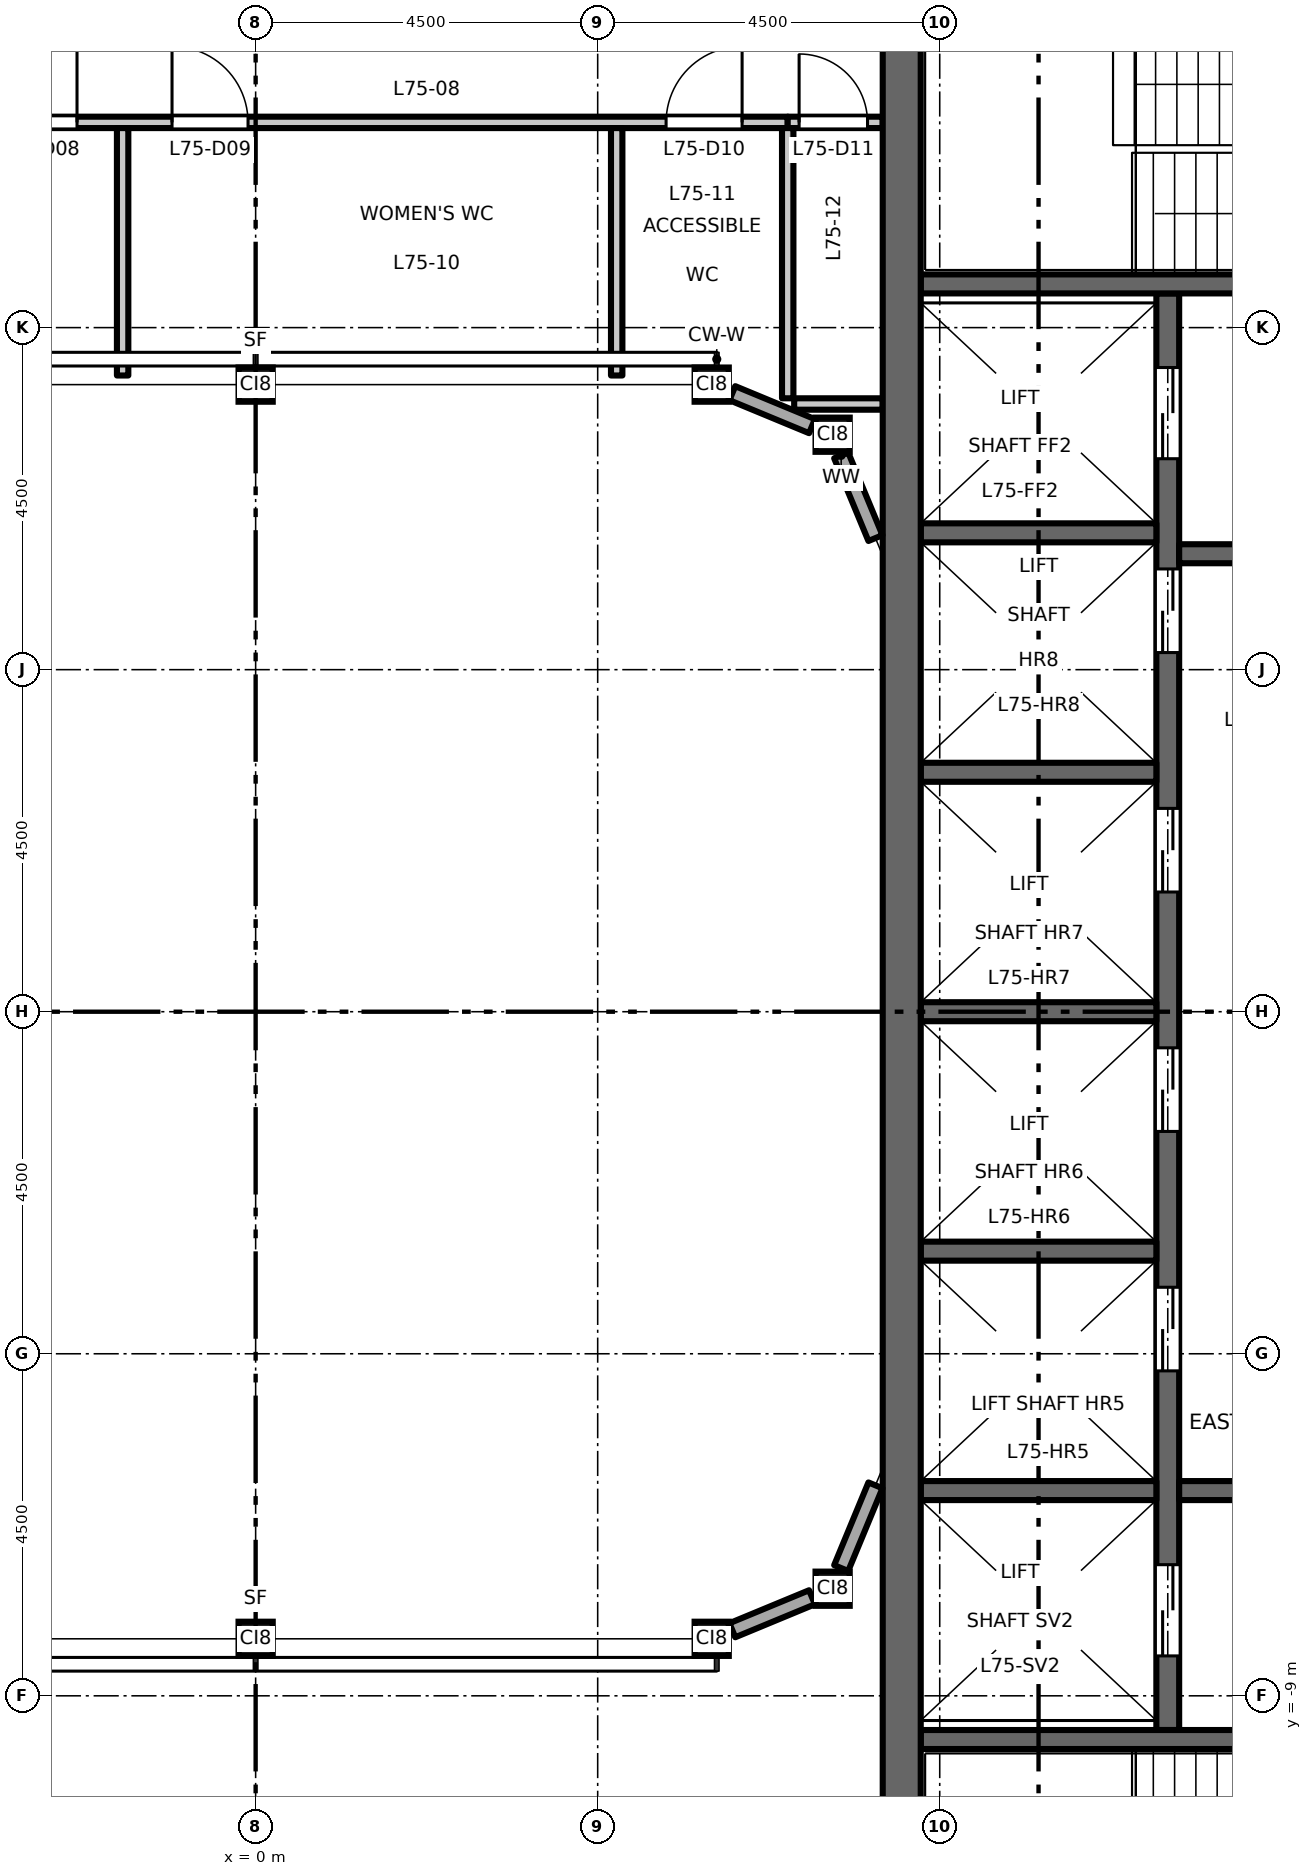
"""IFC4 building model, lengths in metres.
Left out: names, types, materials, properties, quantities, classifications, styles, units other than length and angle.
Written with IfcOpenShell. Run it as: python <this file> out.ifc"""

import sys

from ifc_helpers import new_model, si_unit, direction, frame, frame_2d, origin, origin_2d, place, context, subcontext, project, spatial, rectangle, hollow_rectangle, extrude, element, fill, save


model = new_model("IFC4")
c1 = context("Model", 3, precision=1e-05, world=origin(), true_north=direction((0.0, 1.0)))
c2 = subcontext(c1, "Body", "Model", "MODEL_VIEW")
j1 = project(units=[si_unit("LENGTHUNIT", "METRE"), si_unit("PLANEANGLEUNIT", "RADIAN")], contexts=[c1])
p1 = place(None, origin())
s1 = spatial("IfcSite", under=j1, at=p1, CompositionType="ELEMENT")
p2 = place(p1, origin())
s2 = spatial("IfcBuilding", under=s1, at=p2, CompositionType="ELEMENT")
p3 = place(p2, frame((0.0, 0.0, 348.2)))
s3 = spatial("IfcBuildingStorey", under=s2, at=p3, CompositionType="ELEMENT", Elevation=348.2)
for number, where, z_axis, x_axis in (
    (1, (0.0, -8.25, 0.0), (0.0, 0.0, 1.0), (1.0, 0.0, 0.0)),
    (2, (6.0, -8.25, 0.0), (0.0, 0.0, 1.0), (1.0, 0.0, 0.0)),
    (3, (7.591, -7.591, 0.0), (0.0, 0.0, 1.0), (1.0, 0.0, 0.0)),
    (4, (0.0, 8.25, 0.0), (0.0, 0.0, 1.0), (1.0, 0.0, 0.0)),
    (5, (6.0, 8.25, 0.0), (0.0, 0.0, 1.0), (1.0, 0.0, 0.0)),
    (6, (7.591, 7.591, 0.0), (0.0, 0.0, 1.0), (1.0, 0.0, 0.0)),
):
    element("IfcColumn", number, at=place(p3, frame(where, z_axis=z_axis, x_axis=x_axis)), inside=s3, PredefinedType="COLUMN", context=c2, shape_type="SweptSolid", body=[
        extrude(hollow_rectangle(XDim=0.45, YDim=0.45, WallThickness=0.022, at=origin_2d()), origin(), (0.0, 0.0, 1.0), 5.0),
    ])
p4 = place(p3, frame((12.0, -9.45, 0.0), z_axis=(0.0, 0.0, 1.0), x_axis=(0.0, 1.0, 0.0)))
e7 = element("IfcWall", 7, at=p4, inside=s3, PredefinedType="SHEAR", context=c2, shape_type="SweptSolid", body=[
    extrude(rectangle(XDim=18.9, YDim=0.3, at=frame_2d((9.45, 0.0))), origin(), (0.0, 0.0, 1.0), 4.8),
])
p5 = place(p4, frame((4.725, 0.0, 0.0)))
e8 = element("IfcOpeningElement", 8, at=p5, cuts=e7, PredefinedType="OPENING", context=c2, shape_type="SweptSolid", body=[
    extrude(rectangle(XDim=1.1, YDim=2.1, at=frame_2d((0.55, 1.05))), frame((0.0, 0.16, 0.0), z_axis=(0.0, -1.0, 0.0), x_axis=(1.0, 0.0, 0.0)), (0.0, 0.0, 1.0), 0.32),
])
p6 = place(p4, frame((7.875, 0.0, 0.0)))
e9 = element("IfcOpeningElement", 9, at=p6, cuts=e7, PredefinedType="OPENING", context=c2, shape_type="SweptSolid", body=[
    extrude(rectangle(XDim=1.1, YDim=2.1, at=frame_2d((0.55, 1.05))), frame((0.0, 0.16, 0.0), z_axis=(0.0, -1.0, 0.0), x_axis=(1.0, 0.0, 0.0)), (0.0, 0.0, 1.0), 0.32),
])
p7 = place(p4, frame((11.025, 0.0, 0.0)))
e10 = element("IfcOpeningElement", 10, at=p7, cuts=e7, PredefinedType="OPENING", context=c2, shape_type="SweptSolid", body=[
    extrude(rectangle(XDim=1.1, YDim=2.1, at=frame_2d((0.55, 1.05))), frame((0.0, 0.16, 0.0), z_axis=(0.0, -1.0, 0.0), x_axis=(1.0, 0.0, 0.0)), (0.0, 0.0, 1.0), 0.32),
])
p8 = place(p4, frame((14.175, 0.0, 0.0)))
e11 = element("IfcOpeningElement", 11, at=p8, cuts=e7, PredefinedType="OPENING", context=c2, shape_type="SweptSolid", body=[
    extrude(rectangle(XDim=1.1, YDim=2.1, at=frame_2d((0.55, 1.05))), frame((0.0, 0.16, 0.0), z_axis=(0.0, -1.0, 0.0), x_axis=(1.0, 0.0, 0.0)), (0.0, 0.0, 1.0), 0.32),
])
p9 = place(p4, frame((16.725, 0.0, 0.0)))
e12 = element("IfcOpeningElement", 12, at=p9, cuts=e7, PredefinedType="OPENING", context=c2, shape_type="SweptSolid", body=[
    extrude(rectangle(XDim=1.2, YDim=2.1, at=frame_2d((0.6, 1.05))), frame((0.0, 0.16, 0.0), z_axis=(0.0, -1.0, 0.0), x_axis=(1.0, 0.0, 0.0)), (0.0, 0.0, 1.0), 0.32),
])
p10 = place(p4, frame((0.975, 0.0, 0.0)))
e13 = element("IfcOpeningElement", 13, at=p10, cuts=e7, PredefinedType="OPENING", context=c2, shape_type="SweptSolid", body=[
    extrude(rectangle(XDim=1.2, YDim=2.1, at=frame_2d((0.6, 1.05))), frame((0.0, 0.16, 0.0), z_axis=(0.0, -1.0, 0.0), x_axis=(1.0, 0.0, 0.0)), (0.0, 0.0, 1.0), 0.32),
])
p11 = place(p3, frame((12.15, 6.025, 0.0), z_axis=(0.0, 0.0, 1.0), x_axis=(1.0, 0.0, 0.0)))
e14 = element("IfcWall", 14, at=p11, inside=s3, PredefinedType="SHEAR", context=c2, shape_type="SweptSolid", body=[
    extrude(rectangle(XDim=4.6, YDim=0.25, at=frame_2d((2.3, 0.0))), origin(), (0.0, 0.0, 1.0), 4.8),
])
p12 = place(p11, frame((1.8, 0.0, 0.0)))
e15 = element("IfcOpeningElement", 15, at=p12, cuts=e14, PredefinedType="OPENING", context=c2, shape_type="SweptSolid", body=[
    extrude(rectangle(XDim=1.0, YDim=2.1, at=frame_2d((0.5, 1.05))), frame((0.0, 0.135, 0.0), z_axis=(0.0, -1.0, 0.0), x_axis=(1.0, 0.0, 0.0)), (0.0, 0.0, 1.0), 0.27),
])
p13 = place(p3, frame((12.15, -6.3, 0.0), z_axis=(0.0, 0.0, 1.0), x_axis=(1.0, 0.0, 0.0)))
e16 = element("IfcWall", 16, at=p13, inside=s3, PredefinedType="SHEAR", context=c2, shape_type="SweptSolid", body=[
    extrude(rectangle(XDim=4.6, YDim=0.25, at=frame_2d((2.3, 0.0))), origin(), (0.0, 0.0, 1.0), 4.8),
])
p14 = place(p13, frame((1.8, 0.0, 0.0)))
e17 = element("IfcOpeningElement", 17, at=p14, cuts=e16, PredefinedType="OPENING", context=c2, shape_type="SweptSolid", body=[
    extrude(rectangle(XDim=1.0, YDim=2.1, at=frame_2d((0.5, 1.05))), frame((0.0, 0.135, 0.0), z_axis=(0.0, -1.0, 0.0), x_axis=(1.0, 0.0, 0.0)), (0.0, 0.0, 1.0), 0.27),
])
for number, where, z_axis, x_axis in (
    (18, (8.75, 0.0, 0.0), (0.0, 0.0, 1.0), (1.0, 0.0, 0.0)),
    (19, (8.75, 3.15, 0.0), (0.0, 0.0, 1.0), (1.0, 0.0, 0.0)),
    (20, (8.75, 6.3, 0.0), (0.0, 0.0, 1.0), (1.0, 0.0, 0.0)),
    (21, (8.75, -3.15, 0.0), (0.0, 0.0, 1.0), (1.0, 0.0, 0.0)),
    (22, (8.75, -6.3, 0.0), (0.0, 0.0, 1.0), (1.0, 0.0, 0.0)),
):
    element("IfcWall", number, at=place(p3, frame(where, z_axis=z_axis, x_axis=x_axis)), inside=s3, PredefinedType="SHEAR", context=c2, shape_type="SweptSolid", body=[
        extrude(rectangle(XDim=3.1, YDim=0.25, at=frame_2d((1.55, 0.0))), origin(), (0.0, 0.0, 1.0), 4.8),
    ])
p15 = place(p3, frame((8.75, 9.575, 0.0), z_axis=(0.0, 0.0, 1.0), x_axis=(1.0, 0.0, 0.0)))
e23 = element("IfcWall", 23, at=p15, inside=s3, PredefinedType="SHEAR", context=c2, shape_type="SweptSolid", body=[
    extrude(rectangle(XDim=8.0, YDim=0.25, at=frame_2d((4.0, 0.0))), origin(), (0.0, 0.0, 1.0), 4.8),
])
p16 = place(p15, frame((6.65, 0.0, 0.0)))
e24 = element("IfcOpeningElement", 24, at=p16, cuts=e23, PredefinedType="OPENING", context=c2, shape_type="SweptSolid", body=[
    extrude(rectangle(XDim=1.1, YDim=2.1, at=frame_2d((0.55, 1.05))), frame((0.0, 0.135, 0.0), z_axis=(0.0, -1.0, 0.0), x_axis=(1.0, 0.0, 0.0)), (0.0, 0.0, 1.0), 0.27),
])
p17 = place(p3, frame((8.75, -9.575, 0.0), z_axis=(0.0, 0.0, 1.0), x_axis=(1.0, 0.0, 0.0)))
e25 = element("IfcWall", 25, at=p17, inside=s3, PredefinedType="SHEAR", context=c2, shape_type="SweptSolid", body=[
    extrude(rectangle(XDim=8.0, YDim=0.25, at=frame_2d((4.0, 0.0))), origin(), (0.0, 0.0, 1.0), 4.8),
])
p18 = place(p17, frame((6.65, 0.0, 0.0)))
e26 = element("IfcOpeningElement", 26, at=p18, cuts=e25, PredefinedType="OPENING", context=c2, shape_type="SweptSolid", body=[
    extrude(rectangle(XDim=1.1, YDim=2.1, at=frame_2d((0.55, 1.05))), frame((0.0, 0.135, 0.0), z_axis=(0.0, -1.0, 0.0), x_axis=(1.0, 0.0, 0.0)), (0.0, 0.0, 1.0), 0.27),
])
p19 = place(p3, frame((8.5, -13.0, 0.0), z_axis=(0.0, 0.0, 1.0), x_axis=(0.0, 1.0, 0.0)))
e27 = element("IfcWall", 27, at=p19, inside=s3, PredefinedType="SHEAR", context=c2, shape_type="SweptSolid", body=[
    extrude(rectangle(XDim=26.0, YDim=0.5, at=frame_2d((13.0, 0.0))), origin(), (0.0, 0.0, 1.0), 4.8),
])
p20 = place(p3, frame((6.271, -8.137, 0.0), z_axis=(0.0, 0.0, 1.0), x_axis=(0.923864661962, 0.382719331074, 0.0)))
e28 = element("IfcWall", 28, at=p20, inside=s3, PredefinedType="STANDARD", context=c2, shape_type="SweptSolid", body=[
    extrude(rectangle(XDim=1.134, YDim=0.2, at=frame_2d((0.567, 0.0))), origin(), (0.0, 0.0, 1.0), 4.46),
])
for number, where, z_axis, x_axis in (
    (29, (7.703, -7.319, 0.0), (0.0, 0.0, 1.0), (0.383, 0.924, 0.0)),
    (30, (8.154, 6.231, 0.0), (0.0, 0.0, 1.0), (-0.383, 0.924, 0.0)),
):
    element("IfcWall", number, at=place(p3, frame(where, z_axis=z_axis, x_axis=x_axis)), inside=s3, PredefinedType="STANDARD", context=c2, shape_type="SweptSolid", body=[
        extrude(rectangle(XDim=1.178, YDim=0.2, at=frame_2d((0.589, 0.0))), origin(), (0.0, 0.0, 1.0), 4.46),
    ])
p21 = place(p3, frame((7.319, 7.703, 0.0), z_axis=(0.0, 0.0, 1.0), x_axis=(-0.923864661962, 0.382719331074, 0.0)))
e31 = element("IfcWall", 31, at=p21, inside=s3, PredefinedType="STANDARD", context=c2, shape_type="SweptSolid", body=[
    extrude(rectangle(XDim=1.134, YDim=0.2, at=frame_2d((0.567, 0.0))), origin(), (0.0, 0.0, 1.0), 4.46),
])
p22 = place(p3, frame((7.085, 7.995, 0.0), z_axis=(0.0, 0.0, 1.0), x_axis=(1.0, 0.0, 0.0)))
e32 = element("IfcWall", 32, at=p22, inside=s3, PredefinedType="PARTITIONING", context=c2, shape_type="SweptSolid", body=[
    extrude(rectangle(XDim=1.165, YDim=0.15, at=frame_2d((0.583, 0.0))), origin(), (0.0, 0.0, 1.0), 4.8),
])
p23 = place(p3, frame((-8.25, 11.7, 0.0), z_axis=(0.0, 0.0, 1.0), x_axis=(1.0, 0.0, 0.0)))
e33 = element("IfcWall", 33, at=p23, inside=s3, PredefinedType="PARTITIONING", context=c2, shape_type="SweptSolid", body=[
    extrude(rectangle(XDim=15.25, YDim=0.15, at=frame_2d((7.625, 0.0))), origin(), (0.0, 0.0, 1.0), 4.8),
])
p24 = place(p23, frame((4.9, 0.0, 0.0)))
e34 = element("IfcOpeningElement", 34, at=p24, cuts=e33, PredefinedType="OPENING", context=c2, shape_type="SweptSolid", body=[
    extrude(rectangle(XDim=1.0, YDim=2.1, at=frame_2d((0.5, 1.05))), frame((0.0, 0.085, 0.0), z_axis=(0.0, -1.0, 0.0), x_axis=(1.0, 0.0, 0.0)), (0.0, 0.0, 1.0), 0.17),
])
p25 = place(p23, frame((7.15, 0.0, 0.0)))
e35 = element("IfcOpeningElement", 35, at=p25, cuts=e33, PredefinedType="OPENING", context=c2, shape_type="SweptSolid", body=[
    extrude(rectangle(XDim=1.0, YDim=2.1, at=frame_2d((0.5, 1.05))), frame((0.0, 0.085, 0.0), z_axis=(0.0, -1.0, 0.0), x_axis=(1.0, 0.0, 0.0)), (0.0, 0.0, 1.0), 0.17),
])
p26 = place(p23, frame((13.65, 0.0, 0.0)))
e36 = element("IfcOpeningElement", 36, at=p26, cuts=e33, PredefinedType="OPENING", context=c2, shape_type="SweptSolid", body=[
    extrude(rectangle(XDim=1.0, YDim=2.1, at=frame_2d((0.5, 1.05))), frame((0.0, 0.085, 0.0), z_axis=(0.0, -1.0, 0.0), x_axis=(1.0, 0.0, 0.0)), (0.0, 0.0, 1.0), 0.17),
])
p27 = place(p3, frame((7.0, 11.7, 0.0), z_axis=(0.0, 0.0, 1.0), x_axis=(1.0, 0.0, 0.0)))
e37 = element("IfcWall", 37, at=p27, inside=s3, PredefinedType="PARTITIONING", context=c2, shape_type="SweptSolid", body=[
    extrude(rectangle(XDim=1.25, YDim=0.15, at=frame_2d((0.625, 0.0))), origin(), (0.0, 0.0, 1.0), 4.8),
])
p28 = place(p27, frame((0.15, 0.0, 0.0)))
e38 = element("IfcOpeningElement", 38, at=p28, cuts=e37, PredefinedType="OPENING", context=c2, shape_type="SweptSolid", body=[
    extrude(rectangle(XDim=0.9, YDim=2.1, at=frame_2d((0.45, 1.05))), frame((0.0, 0.085, 0.0), z_axis=(0.0, -1.0, 0.0), x_axis=(1.0, 0.0, 0.0)), (0.0, 0.0, 1.0), 0.17),
])
for number, where, z_axis, x_axis in (
    (39, (-1.75, 8.37, 0.0), (0.0, 0.0, 1.0), (0.0, 1.0, 0.0)),
    (40, (4.75, 8.37, 0.0), (0.0, 0.0, 1.0), (0.0, 1.0, 0.0)),
):
    element("IfcWall", number, at=place(p3, frame(where, z_axis=z_axis, x_axis=x_axis)), inside=s3, PredefinedType="PARTITIONING", context=c2, shape_type="SweptSolid", body=[
        extrude(rectangle(XDim=3.255, YDim=0.15, at=frame_2d((1.627, 0.0))), origin(), (0.0, 0.0, 1.0), 4.8),
    ])
p29 = place(p3, frame((7.0, 8.07, 0.0), z_axis=(0.0, 0.0, 1.0), x_axis=(0.0, 1.0, 0.0)))
e41 = element("IfcWall", 41, at=p29, inside=s3, PredefinedType="PARTITIONING", context=c2, shape_type="SweptSolid", body=[
    extrude(rectangle(XDim=3.555, YDim=0.15, at=frame_2d((1.777, 0.0))), origin(), (0.0, 0.0, 1.0), 4.8),
])
p30 = place(p5, origin())
e42 = element("IfcDoor", 42, at=p30, inside=s3, OperationType="DOUBLE_DOOR_SLIDING", PredefinedType="DOOR", context=c2, shape_type="SweptSolid", body=[
    extrude(rectangle(XDim=1.1, YDim=2.1, at=frame_2d((0.55, 1.05))), frame((0.0, 0.025, 0.0), z_axis=(0.0, -1.0, 0.0), x_axis=(1.0, 0.0, 0.0)), (0.0, 0.0, 1.0), 0.05),
])
fill(e8, e42)
p31 = place(p6, origin())
e43 = element("IfcDoor", 43, at=p31, inside=s3, OperationType="DOUBLE_DOOR_SLIDING", PredefinedType="DOOR", context=c2, shape_type="SweptSolid", body=[
    extrude(rectangle(XDim=1.1, YDim=2.1, at=frame_2d((0.55, 1.05))), frame((0.0, 0.025, 0.0), z_axis=(0.0, -1.0, 0.0), x_axis=(1.0, 0.0, 0.0)), (0.0, 0.0, 1.0), 0.05),
])
fill(e9, e43)
p32 = place(p7, origin())
e44 = element("IfcDoor", 44, at=p32, inside=s3, OperationType="DOUBLE_DOOR_SLIDING", PredefinedType="DOOR", context=c2, shape_type="SweptSolid", body=[
    extrude(rectangle(XDim=1.1, YDim=2.1, at=frame_2d((0.55, 1.05))), frame((0.0, 0.025, 0.0), z_axis=(0.0, -1.0, 0.0), x_axis=(1.0, 0.0, 0.0)), (0.0, 0.0, 1.0), 0.05),
])
fill(e10, e44)
p33 = place(p8, origin())
e45 = element("IfcDoor", 45, at=p33, inside=s3, OperationType="DOUBLE_DOOR_SLIDING", PredefinedType="DOOR", context=c2, shape_type="SweptSolid", body=[
    extrude(rectangle(XDim=1.1, YDim=2.1, at=frame_2d((0.55, 1.05))), frame((0.0, 0.025, 0.0), z_axis=(0.0, -1.0, 0.0), x_axis=(1.0, 0.0, 0.0)), (0.0, 0.0, 1.0), 0.05),
])
fill(e11, e45)
p34 = place(p9, origin())
e46 = element("IfcDoor", 46, at=p34, inside=s3, OperationType="DOUBLE_DOOR_SLIDING", PredefinedType="DOOR", context=c2, shape_type="SweptSolid", body=[
    extrude(rectangle(XDim=1.2, YDim=2.1, at=frame_2d((0.6, 1.05))), frame((0.0, 0.025, 0.0), z_axis=(0.0, -1.0, 0.0), x_axis=(1.0, 0.0, 0.0)), (0.0, 0.0, 1.0), 0.05),
])
fill(e12, e46)
p35 = place(p10, origin())
e47 = element("IfcDoor", 47, at=p35, inside=s3, OperationType="DOUBLE_DOOR_SLIDING", PredefinedType="DOOR", context=c2, shape_type="SweptSolid", body=[
    extrude(rectangle(XDim=1.2, YDim=2.1, at=frame_2d((0.6, 1.05))), frame((0.0, 0.025, 0.0), z_axis=(0.0, -1.0, 0.0), x_axis=(1.0, 0.0, 0.0)), (0.0, 0.0, 1.0), 0.05),
])
fill(e13, e47)
p36 = place(p24, origin())
e48 = element("IfcDoor", 48, at=p36, inside=s3, OperationType="SINGLE_SWING_RIGHT", PredefinedType="DOOR", context=c2, shape_type="SweptSolid", body=[
    extrude(rectangle(XDim=1.0, YDim=2.1, at=frame_2d((0.5, 1.05))), frame((0.0, 0.025, 0.0), z_axis=(0.0, -1.0, 0.0), x_axis=(1.0, 0.0, 0.0)), (0.0, 0.0, 1.0), 0.05),
])
fill(e34, e48)
p37 = place(p25, origin())
e49 = element("IfcDoor", 49, at=p37, inside=s3, OperationType="SINGLE_SWING_LEFT", PredefinedType="DOOR", context=c2, shape_type="SweptSolid", body=[
    extrude(rectangle(XDim=1.0, YDim=2.1, at=frame_2d((0.5, 1.05))), frame((0.0, 0.025, 0.0), z_axis=(0.0, -1.0, 0.0), x_axis=(1.0, 0.0, 0.0)), (0.0, 0.0, 1.0), 0.05),
])
fill(e35, e49)
p38 = place(p26, origin())
e50 = element("IfcDoor", 50, at=p38, inside=s3, OperationType="SINGLE_SWING_RIGHT", PredefinedType="DOOR", context=c2, shape_type="SweptSolid", body=[
    extrude(rectangle(XDim=1.0, YDim=2.1, at=frame_2d((0.5, 1.05))), frame((0.0, 0.025, 0.0), z_axis=(0.0, -1.0, 0.0), x_axis=(1.0, 0.0, 0.0)), (0.0, 0.0, 1.0), 0.05),
])
fill(e36, e50)
p39 = place(p28, origin())
e51 = element("IfcDoor", 51, at=p39, inside=s3, OperationType="SINGLE_SWING_LEFT", PredefinedType="DOOR", context=c2, shape_type="SweptSolid", body=[
    extrude(rectangle(XDim=0.9, YDim=2.1, at=frame_2d((0.45, 1.05))), frame((0.0, 0.025, 0.0), z_axis=(0.0, -1.0, 0.0), x_axis=(1.0, 0.0, 0.0)), (0.0, 0.0, 1.0), 0.05),
])
fill(e38, e51)
save(model, sys.argv[1])
